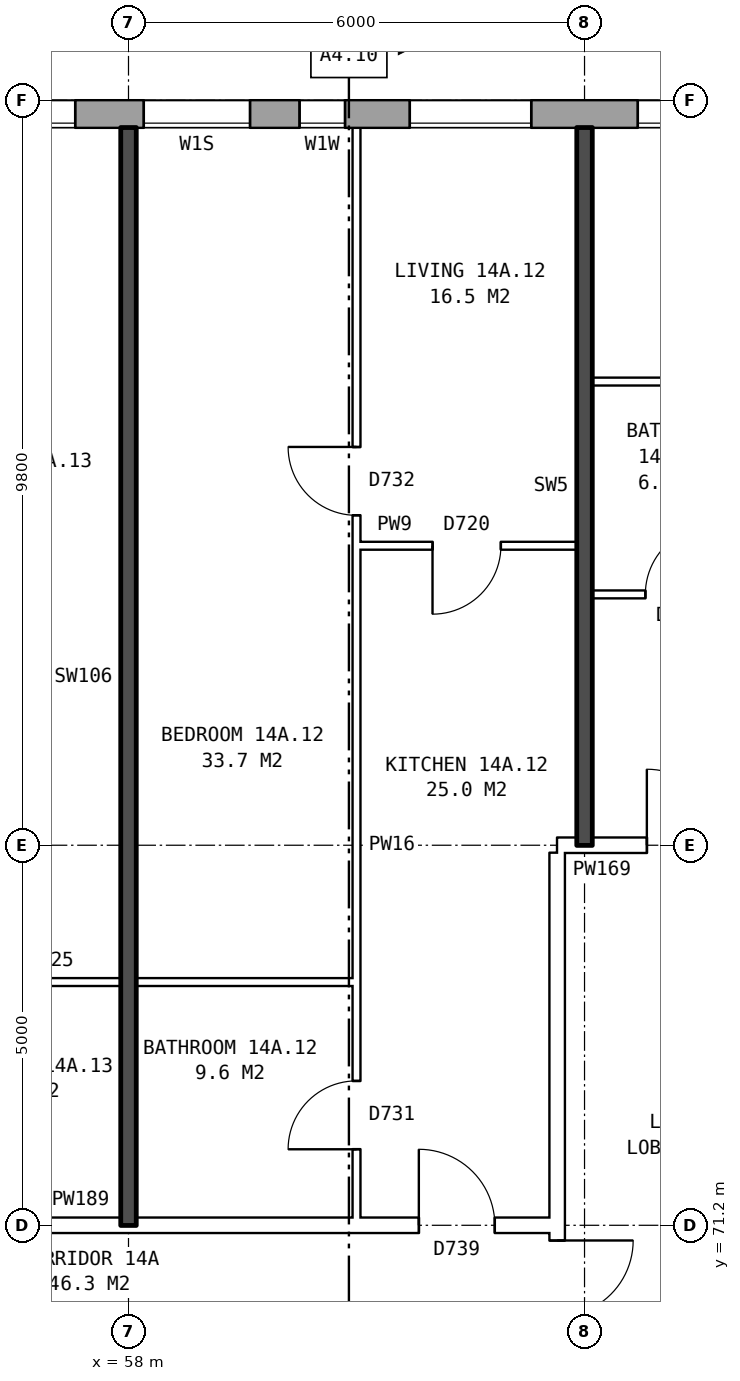
"""IFC4 building model, lengths in metres.
Left out: names, types, materials, properties, quantities, classifications, styles, units other than length and angle.
Written with IfcOpenShell. Run it as: python <this file> out.ifc"""

import sys

from ifc_helpers import new_model, si_unit, direction, frame, frame_2d, origin, place, context, subcontext, project, spatial, rectangle, extrude, element, fill, save


model = new_model("IFC4")
c1 = context("Model", 3, precision=1e-05, world=origin(), true_north=direction((0.0, 1.0)))
c2 = subcontext(c1, "Body", "Model", "MODEL_VIEW")
j1 = project(units=[si_unit("LENGTHUNIT", "METRE"), si_unit("PLANEANGLEUNIT", "RADIAN")], contexts=[c1])
p1 = place(None, origin())
s1 = spatial("IfcSite", under=j1, at=p1, CompositionType="ELEMENT")
p2 = place(p1, origin())
s2 = spatial("IfcBuilding", under=s1, at=p2, CompositionType="ELEMENT")
p3 = place(p2, frame((0.0, 0.0, 53.6)))
s3 = spatial("IfcBuildingStorey", under=s2, at=p3, CompositionType="ELEMENT", Elevation=53.6)
p4 = place(p3, frame((72.925, 85.82, 0.0), z_axis=(0.0, 0.0, 1.0), x_axis=(-1.0, 0.0, 0.0)))
e1 = element("IfcWall", 1, at=p4, inside=s3, PredefinedType="STANDARD", context=c2, shape_type="SweptSolid", body=[
    extrude(rectangle(XDim=48.351, YDim=0.36, at=frame_2d((24.175, 0.0))), origin(), (0.0, 0.0, 1.0), 2.85),
])
p5 = place(p4, frame((0.625, 0.0, 0.8)))
e2 = element("IfcOpeningElement", 2, at=p5, cuts=e1, PredefinedType="OPENING", context=c2, shape_type="SweptSolid", body=[
    extrude(rectangle(XDim=1.6, YDim=1.8, at=frame_2d((0.8, 0.9))), frame((0.0, 0.19, 0.0), z_axis=(0.0, -1.0, 0.0), x_axis=(1.0, 0.0, 0.0)), (0.0, 0.0, 1.0), 0.38),
])
p6 = place(p4, frame((3.625, 0.0, 0.8)))
e3 = element("IfcOpeningElement", 3, at=p6, cuts=e1, PredefinedType="OPENING", context=c2, shape_type="SweptSolid", body=[
    extrude(rectangle(XDim=1.6, YDim=1.8, at=frame_2d((0.8, 0.9))), frame((0.0, 0.19, 0.0), z_axis=(0.0, -1.0, 0.0), x_axis=(1.0, 0.0, 0.0)), (0.0, 0.0, 1.0), 0.38),
])
p7 = place(p4, frame((6.625, 0.0, 0.8)))
e4 = element("IfcOpeningElement", 4, at=p7, cuts=e1, PredefinedType="OPENING", context=c2, shape_type="SweptSolid", body=[
    extrude(rectangle(XDim=1.6, YDim=1.8, at=frame_2d((0.8, 0.9))), frame((0.0, 0.19, 0.0), z_axis=(0.0, -1.0, 0.0), x_axis=(1.0, 0.0, 0.0)), (0.0, 0.0, 1.0), 0.38),
])
p8 = place(p4, frame((9.625, 0.0, 0.8)))
e5 = element("IfcOpeningElement", 5, at=p8, cuts=e1, PredefinedType="OPENING", context=c2, shape_type="SweptSolid", body=[
    extrude(rectangle(XDim=1.6, YDim=1.8, at=frame_2d((0.8, 0.9))), frame((0.0, 0.19, 0.0), z_axis=(0.0, -1.0, 0.0), x_axis=(1.0, 0.0, 0.0)), (0.0, 0.0, 1.0), 0.38),
])
p9 = place(p4, frame((12.075, 0.0, 1.55)))
e6 = element("IfcOpeningElement", 6, at=p9, cuts=e1, PredefinedType="OPENING", context=c2, shape_type="SweptSolid", body=[
    extrude(rectangle(XDim=0.6, YDim=0.9, at=frame_2d((0.3, 0.45))), frame((0.0, 0.19, 0.0), z_axis=(0.0, -1.0, 0.0), x_axis=(1.0, 0.0, 0.0)), (0.0, 0.0, 1.0), 0.38),
])
p10 = place(p4, frame((15.625, 0.0, 0.8)))
e7 = element("IfcOpeningElement", 7, at=p10, cuts=e1, PredefinedType="OPENING", context=c2, shape_type="SweptSolid", body=[
    extrude(rectangle(XDim=1.6, YDim=1.8, at=frame_2d((0.8, 0.9))), frame((0.0, 0.19, 0.0), z_axis=(0.0, -1.0, 0.0), x_axis=(1.0, 0.0, 0.0)), (0.0, 0.0, 1.0), 0.38),
])
p11 = place(p4, frame((18.625, 0.0, 0.8)))
e8 = element("IfcOpeningElement", 8, at=p11, cuts=e1, PredefinedType="OPENING", context=c2, shape_type="SweptSolid", body=[
    extrude(rectangle(XDim=1.6, YDim=1.8, at=frame_2d((0.8, 0.9))), frame((0.0, 0.19, 0.0), z_axis=(0.0, -1.0, 0.0), x_axis=(1.0, 0.0, 0.0)), (0.0, 0.0, 1.0), 0.38),
])
p12 = place(p4, frame((21.625, 0.0, 0.8)))
e9 = element("IfcOpeningElement", 9, at=p12, cuts=e1, PredefinedType="OPENING", context=c2, shape_type="SweptSolid", body=[
    extrude(rectangle(XDim=1.6, YDim=1.8, at=frame_2d((0.8, 0.9))), frame((0.0, 0.19, 0.0), z_axis=(0.0, -1.0, 0.0), x_axis=(1.0, 0.0, 0.0)), (0.0, 0.0, 1.0), 0.38),
])
p13 = place(p4, frame((24.625, 0.0, 0.8)))
e10 = element("IfcOpeningElement", 10, at=p13, cuts=e1, PredefinedType="OPENING", context=c2, shape_type="SweptSolid", body=[
    extrude(rectangle(XDim=1.6, YDim=1.8, at=frame_2d((0.8, 0.9))), frame((0.0, 0.19, 0.0), z_axis=(0.0, -1.0, 0.0), x_axis=(1.0, 0.0, 0.0)), (0.0, 0.0, 1.0), 0.38),
])
p14 = place(p4, frame((27.625, 0.0, 0.8)))
e11 = element("IfcOpeningElement", 11, at=p14, cuts=e1, PredefinedType="OPENING", context=c2, shape_type="SweptSolid", body=[
    extrude(rectangle(XDim=1.6, YDim=1.8, at=frame_2d((0.8, 0.9))), frame((0.0, 0.19, 0.0), z_axis=(0.0, -1.0, 0.0), x_axis=(1.0, 0.0, 0.0)), (0.0, 0.0, 1.0), 0.38),
])
p15 = place(p4, frame((30.625, 0.0, 0.8)))
e12 = element("IfcOpeningElement", 12, at=p15, cuts=e1, PredefinedType="OPENING", context=c2, shape_type="SweptSolid", body=[
    extrude(rectangle(XDim=1.6, YDim=1.8, at=frame_2d((0.8, 0.9))), frame((0.0, 0.19, 0.0), z_axis=(0.0, -1.0, 0.0), x_axis=(1.0, 0.0, 0.0)), (0.0, 0.0, 1.0), 0.38),
])
p16 = place(p4, frame((33.125, 0.0, 0.25)))
e13 = element("IfcOpeningElement", 13, at=p16, cuts=e1, PredefinedType="OPENING", context=c2, shape_type="SweptSolid", body=[
    extrude(rectangle(XDim=0.8, YDim=1.5, at=frame_2d((0.4, 0.75))), frame((0.0, 0.19, 0.0), z_axis=(0.0, -1.0, 0.0), x_axis=(1.0, 0.0, 0.0)), (0.0, 0.0, 1.0), 0.38),
])
p17 = place(p4, frame((36.625, 0.0, 0.8)))
e14 = element("IfcOpeningElement", 14, at=p17, cuts=e1, PredefinedType="OPENING", context=c2, shape_type="SweptSolid", body=[
    extrude(rectangle(XDim=1.6, YDim=1.8, at=frame_2d((0.8, 0.9))), frame((0.0, 0.19, 0.0), z_axis=(0.0, -1.0, 0.0), x_axis=(1.0, 0.0, 0.0)), (0.0, 0.0, 1.0), 0.38),
])
p18 = place(p4, frame((39.625, 0.0, 0.8)))
e15 = element("IfcOpeningElement", 15, at=p18, cuts=e1, PredefinedType="OPENING", context=c2, shape_type="SweptSolid", body=[
    extrude(rectangle(XDim=1.6, YDim=1.8, at=frame_2d((0.8, 0.9))), frame((0.0, 0.19, 0.0), z_axis=(0.0, -1.0, 0.0), x_axis=(1.0, 0.0, 0.0)), (0.0, 0.0, 1.0), 0.38),
])
p19 = place(p4, frame((42.625, 0.0, 0.8)))
e16 = element("IfcOpeningElement", 16, at=p19, cuts=e1, PredefinedType="OPENING", context=c2, shape_type="SweptSolid", body=[
    extrude(rectangle(XDim=1.6, YDim=1.8, at=frame_2d((0.8, 0.9))), frame((0.0, 0.19, 0.0), z_axis=(0.0, -1.0, 0.0), x_axis=(1.0, 0.0, 0.0)), (0.0, 0.0, 1.0), 0.38),
])
p20 = place(p4, frame((45.625, 0.0, 0.8)))
e17 = element("IfcOpeningElement", 17, at=p20, cuts=e1, PredefinedType="OPENING", context=c2, shape_type="SweptSolid", body=[
    extrude(rectangle(XDim=1.6, YDim=1.8, at=frame_2d((0.8, 0.9))), frame((0.0, 0.19, 0.0), z_axis=(0.0, -1.0, 0.0), x_axis=(1.0, 0.0, 0.0)), (0.0, 0.0, 1.0), 0.38),
])
p21 = place(p4, frame((13.325, 0.0, 0.15)))
e18 = element("IfcOpeningElement", 18, at=p21, cuts=e1, PredefinedType="OPENING", context=c2, shape_type="SweptSolid", body=[
    extrude(rectangle(XDim=1.4, YDim=0.9, at=frame_2d((0.7, 0.45))), frame((0.0, 0.19, 0.0), z_axis=(0.0, -1.0, 0.0), x_axis=(1.0, 0.0, 0.0)), (0.0, 0.0, 1.0), 0.38),
])
p22 = place(p4, frame((34.225, 0.0, 0.25)))
e19 = element("IfcOpeningElement", 19, at=p22, cuts=e1, PredefinedType="OPENING", context=c2, shape_type="SweptSolid", body=[
    extrude(rectangle(XDim=0.6, YDim=0.9, at=frame_2d((0.3, 0.45))), frame((0.0, 0.19, 0.0), z_axis=(0.0, -1.0, 0.0), x_axis=(1.0, 0.0, 0.0)), (0.0, 0.0, 1.0), 0.38),
])
p23 = place(p3, frame((63.64, 63.9, 0.0), z_axis=(0.0, 0.0, 1.0), x_axis=(0.0, 1.0, 0.0)))
e20 = element("IfcWall", 20, at=p23, inside=s3, PredefinedType="PARTITIONING", context=c2, shape_type="SweptSolid", body=[
    extrude(rectangle(XDim=12.2, YDim=0.2, at=frame_2d((6.1, 0.0))), origin(), (0.0, 0.0, 1.0), 2.85),
])
p24 = place(p23, frame((5.1, 0.0, 0.0)))
e21 = element("IfcOpeningElement", 21, at=p24, cuts=e20, PredefinedType="OPENING", context=c2, shape_type="SweptSolid", body=[
    extrude(rectangle(XDim=2.0, YDim=2.1, at=frame_2d((1.0, 1.05))), frame((0.0, 0.11, 0.0), z_axis=(0.0, -1.0, 0.0), x_axis=(1.0, 0.0, 0.0)), (0.0, 0.0, 1.0), 0.22),
])
p25 = place(p3, frame((44.36, 71.2, 0.0), z_axis=(0.0, 0.0, 1.0), x_axis=(1.0, 0.0, 0.0)))
e22 = element("IfcWall", 22, at=p25, inside=s3, PredefinedType="PARTITIONING", context=c2, shape_type="SweptSolid", body=[
    extrude(rectangle(XDim=19.28, YDim=0.2, at=frame_2d((9.64, 0.0))), origin(), (0.0, 0.0, 1.0), 2.85),
])
p26 = place(p25, frame((17.46, 0.0, 0.0)))
e23 = element("IfcOpeningElement", 23, at=p26, cuts=e22, PredefinedType="OPENING", context=c2, shape_type="SweptSolid", body=[
    extrude(rectangle(XDim=1.0, YDim=2.1, at=frame_2d((0.5, 1.05))), frame((0.0, 0.11, 0.0), z_axis=(0.0, -1.0, 0.0), x_axis=(1.0, 0.0, 0.0)), (0.0, 0.0, 1.0), 0.22),
])
p27 = place(p25, frame((8.64, 0.0, 0.0)))
e24 = element("IfcOpeningElement", 24, at=p27, cuts=e22, PredefinedType="OPENING", context=c2, shape_type="SweptSolid", body=[
    extrude(rectangle(XDim=1.0, YDim=2.1, at=frame_2d((0.5, 1.05))), frame((0.0, 0.11, 0.0), z_axis=(0.0, -1.0, 0.0), x_axis=(1.0, 0.0, 0.0)), (0.0, 0.0, 1.0), 0.22),
])
p28 = place(p25, frame((5.64, 0.0, 0.0)))
e25 = element("IfcOpeningElement", 25, at=p28, cuts=e22, PredefinedType="OPENING", context=c2, shape_type="SweptSolid", body=[
    extrude(rectangle(XDim=1.0, YDim=2.1, at=frame_2d((0.5, 1.05))), frame((0.0, 0.11, 0.0), z_axis=(0.0, -1.0, 0.0), x_axis=(1.0, 0.0, 0.0)), (0.0, 0.0, 1.0), 0.22),
])
p29 = place(p3, frame((55.0, 74.4, 0.0), z_axis=(0.0, 0.0, 1.0), x_axis=(1.0, 0.0, 0.0)))
e26 = element("IfcWall", 26, at=p29, inside=s3, PredefinedType="PARTITIONING", context=c2, shape_type="SweptSolid", body=[
    extrude(rectangle(XDim=6.0, YDim=0.1, at=frame_2d((3.0, 0.0))), origin(), (0.0, 0.0, 1.0), 2.85),
])
p30 = place(p3, frame((63.64, 76.2, 0.0), z_axis=(0.0, 0.0, 1.0), x_axis=(1.0, 0.0, 0.0)))
e27 = element("IfcWall", 27, at=p30, inside=s3, PredefinedType="PARTITIONING", context=c2, shape_type="SweptSolid", body=[
    extrude(rectangle(XDim=3.0, YDim=0.2, at=frame_2d((1.5, 0.0))), origin(), (0.0, 0.0, 1.0), 2.85),
])
p31 = place(p30, frame((1.18, 0.0, 0.0)))
e28 = element("IfcOpeningElement", 28, at=p31, cuts=e27, PredefinedType="OPENING", context=c2, shape_type="SweptSolid", body=[
    extrude(rectangle(XDim=1.0, YDim=2.1, at=frame_2d((0.5, 1.05))), frame((0.0, 0.11, 0.0), z_axis=(0.0, -1.0, 0.0), x_axis=(1.0, 0.0, 0.0)), (0.0, 0.0, 1.0), 0.22),
])
p32 = place(p3, frame((64.1, 79.5, 0.0), z_axis=(0.0, 0.0, 1.0), x_axis=(1.0, 0.0, 0.0)))
e29 = element("IfcWall", 29, at=p32, inside=s3, PredefinedType="PARTITIONING", context=c2, shape_type="SweptSolid", body=[
    extrude(rectangle(XDim=5.8, YDim=0.1, at=frame_2d((2.9, 0.0))), origin(), (0.0, 0.0, 1.0), 2.85),
])
p33 = place(p32, frame((3.6, 0.0, 0.0)))
e30 = element("IfcOpeningElement", 30, at=p33, cuts=e29, PredefinedType="OPENING", context=c2, shape_type="SweptSolid", body=[
    extrude(rectangle(XDim=0.9, YDim=2.1, at=frame_2d((0.45, 1.05))), frame((0.0, 0.06, 0.0), z_axis=(0.0, -1.0, 0.0), x_axis=(1.0, 0.0, 0.0)), (0.0, 0.0, 1.0), 0.12),
])
p34 = place(p32, frame((0.7, 0.0, 0.0)))
e31 = element("IfcOpeningElement", 31, at=p34, cuts=e29, PredefinedType="OPENING", context=c2, shape_type="SweptSolid", body=[
    extrude(rectangle(XDim=0.9, YDim=2.1, at=frame_2d((0.45, 1.05))), frame((0.0, 0.06, 0.0), z_axis=(0.0, -1.0, 0.0), x_axis=(1.0, 0.0, 0.0)), (0.0, 0.0, 1.0), 0.12),
])
p35 = place(p3, frame((61.0, 80.14, 0.0), z_axis=(0.0, 0.0, 1.0), x_axis=(1.0, 0.0, 0.0)))
e32 = element("IfcWall", 32, at=p35, inside=s3, PredefinedType="PARTITIONING", context=c2, shape_type="SweptSolid", body=[
    extrude(rectangle(XDim=2.9, YDim=0.1, at=frame_2d((1.45, 0.0))), origin(), (0.0, 0.0, 1.0), 2.85),
])
p36 = place(p35, frame((1.0, 0.0, 0.0)))
e33 = element("IfcOpeningElement", 33, at=p36, cuts=e32, PredefinedType="OPENING", context=c2, shape_type="SweptSolid", body=[
    extrude(rectangle(XDim=0.9, YDim=2.1, at=frame_2d((0.45, 1.05))), frame((0.0, 0.06, 0.0), z_axis=(0.0, -1.0, 0.0), x_axis=(1.0, 0.0, 0.0)), (0.0, 0.0, 1.0), 0.12),
])
p37 = place(p3, frame((64.1, 82.3, 0.0), z_axis=(0.0, 0.0, 1.0), x_axis=(1.0, 0.0, 0.0)))
e34 = element("IfcWall", 34, at=p37, inside=s3, PredefinedType="PARTITIONING", context=c2, shape_type="SweptSolid", body=[
    extrude(rectangle(XDim=2.3, YDim=0.1, at=frame_2d((1.15, 0.0))), origin(), (0.0, 0.0, 1.0), 2.85),
])
p38 = place(p3, frame((58.0, 71.2, 0.0), z_axis=(0.0, 0.0, 1.0), x_axis=(0.0, 1.0, 0.0)))
e35 = element("IfcWall", 35, at=p38, inside=s3, PredefinedType="SOLIDWALL", context=c2, shape_type="SweptSolid", body=[
    extrude(rectangle(XDim=14.44, YDim=0.2, at=frame_2d((7.22, 0.0))), origin(), (0.0, 0.0, 1.0), 2.85),
])
p39 = place(p3, frame((61.0, 71.3, 0.0), z_axis=(0.0, 0.0, 1.0), x_axis=(0.0, 1.0, 0.0)))
e36 = element("IfcWall", 36, at=p39, inside=s3, PredefinedType="PARTITIONING", context=c2, shape_type="SweptSolid", body=[
    extrude(rectangle(XDim=14.34, YDim=0.1, at=frame_2d((7.17, 0.0))), origin(), (0.0, 0.0, 1.0), 2.85),
])
p40 = place(p39, frame((9.24, 0.0, 0.0)))
e37 = element("IfcOpeningElement", 37, at=p40, cuts=e36, PredefinedType="OPENING", context=c2, shape_type="SweptSolid", body=[
    extrude(rectangle(XDim=0.9, YDim=2.1, at=frame_2d((0.45, 1.05))), frame((0.0, 0.06, 0.0), z_axis=(0.0, -1.0, 0.0), x_axis=(1.0, 0.0, 0.0)), (0.0, 0.0, 1.0), 0.12),
])
p41 = place(p39, frame((0.9, 0.0, 0.0)))
e38 = element("IfcOpeningElement", 38, at=p41, cuts=e36, PredefinedType="OPENING", context=c2, shape_type="SweptSolid", body=[
    extrude(rectangle(XDim=0.9, YDim=2.1, at=frame_2d((0.45, 1.05))), frame((0.0, 0.06, 0.0), z_axis=(0.0, -1.0, 0.0), x_axis=(1.0, 0.0, 0.0)), (0.0, 0.0, 1.0), 0.12),
])
p42 = place(p3, frame((64.0, 76.2, 0.0), z_axis=(0.0, 0.0, 1.0), x_axis=(0.0, 1.0, 0.0)))
e39 = element("IfcWall", 39, at=p42, inside=s3, PredefinedType="SOLIDWALL", context=c2, shape_type="SweptSolid", body=[
    extrude(rectangle(XDim=9.44, YDim=0.2, at=frame_2d((4.72, 0.0))), origin(), (0.0, 0.0, 1.0), 2.85),
])
p43 = place(p7, origin())
e40 = element("IfcWindow", 40, at=p43, inside=s3, PartitioningType="SINGLE_PANEL", PredefinedType="WINDOW", context=c2, shape_type="SweptSolid", body=[
    extrude(rectangle(XDim=1.6, YDim=1.8, at=frame_2d((0.8, 0.9))), frame((0.0, 0.15, 0.0), z_axis=(0.0, -1.0, 0.0), x_axis=(1.0, 0.0, 0.0)), (0.0, 0.0, 1.0), 0.06),
])
fill(e4, e40)
p44 = place(p8, origin())
e41 = element("IfcWindow", 41, at=p44, inside=s3, PartitioningType="SINGLE_PANEL", PredefinedType="WINDOW", context=c2, shape_type="SweptSolid", body=[
    extrude(rectangle(XDim=1.6, YDim=1.8, at=frame_2d((0.8, 0.9))), frame((0.0, 0.15, 0.0), z_axis=(0.0, -1.0, 0.0), x_axis=(1.0, 0.0, 0.0)), (0.0, 0.0, 1.0), 0.06),
])
fill(e5, e41)
p45 = place(p9, origin())
e42 = element("IfcWindow", 42, at=p45, inside=s3, PartitioningType="SINGLE_PANEL", PredefinedType="WINDOW", context=c2, shape_type="SweptSolid", body=[
    extrude(rectangle(XDim=0.6, YDim=0.9, at=frame_2d((0.3, 0.45))), frame((0.0, 0.15, 0.0), z_axis=(0.0, -1.0, 0.0), x_axis=(1.0, 0.0, 0.0)), (0.0, 0.0, 1.0), 0.06),
])
fill(e6, e42)
p46 = place(p10, origin())
e43 = element("IfcWindow", 43, at=p46, inside=s3, PartitioningType="SINGLE_PANEL", PredefinedType="WINDOW", context=c2, shape_type="SweptSolid", body=[
    extrude(rectangle(XDim=1.6, YDim=1.8, at=frame_2d((0.8, 0.9))), frame((0.0, 0.15, 0.0), z_axis=(0.0, -1.0, 0.0), x_axis=(1.0, 0.0, 0.0)), (0.0, 0.0, 1.0), 0.06),
])
fill(e7, e43)
p47 = place(p24, frame((2.0, 0.0, 0.0), z_axis=(0.0, 0.0, 1.0), x_axis=(-1.0, 0.0, 0.0)))
e44 = element("IfcDoor", 44, at=p47, inside=s3, OperationType="DOUBLE_DOOR_SINGLE_SWING", PredefinedType="DOOR", context=c2, shape_type="SweptSolid", body=[
    extrude(rectangle(XDim=2.0, YDim=2.1, at=frame_2d((1.0, 1.05))), frame((0.0, 0.025, 0.0), z_axis=(0.0, -1.0, 0.0), x_axis=(1.0, 0.0, 0.0)), (0.0, 0.0, 1.0), 0.05),
])
fill(e21, e44)
p48 = place(p31, origin())
e45 = element("IfcDoor", 45, at=p48, inside=s3, OperationType="SINGLE_SWING_LEFT", PredefinedType="DOOR", context=c2, shape_type="SweptSolid", body=[
    extrude(rectangle(XDim=1.0, YDim=2.1, at=frame_2d((0.5, 1.05))), frame((0.0, 0.025, 0.0), z_axis=(0.0, -1.0, 0.0), x_axis=(1.0, 0.0, 0.0)), (0.0, 0.0, 1.0), 0.05),
])
fill(e28, e45)
p49 = place(p34, origin())
e46 = element("IfcDoor", 46, at=p49, inside=s3, OperationType="SINGLE_SWING_RIGHT", PredefinedType="DOOR", context=c2, shape_type="SweptSolid", body=[
    extrude(rectangle(XDim=0.9, YDim=2.1, at=frame_2d((0.45, 1.05))), frame((0.0, 0.025, 0.0), z_axis=(0.0, -1.0, 0.0), x_axis=(1.0, 0.0, 0.0)), (0.0, 0.0, 1.0), 0.05),
])
fill(e31, e46)
p50 = place(p40, origin())
e47 = element("IfcDoor", 47, at=p50, inside=s3, OperationType="SINGLE_SWING_RIGHT", PredefinedType="DOOR", context=c2, shape_type="SweptSolid", body=[
    extrude(rectangle(XDim=0.9, YDim=2.1, at=frame_2d((0.45, 1.05))), frame((0.0, 0.025, 0.0), z_axis=(0.0, -1.0, 0.0), x_axis=(1.0, 0.0, 0.0)), (0.0, 0.0, 1.0), 0.05),
])
fill(e37, e47)
p51 = place(p26, origin())
e48 = element("IfcDoor", 48, at=p51, inside=s3, OperationType="SINGLE_SWING_LEFT", PredefinedType="DOOR", context=c2, shape_type="SweptSolid", body=[
    extrude(rectangle(XDim=1.0, YDim=2.1, at=frame_2d((0.5, 1.05))), frame((0.0, 0.025, 0.0), z_axis=(0.0, -1.0, 0.0), x_axis=(1.0, 0.0, 0.0)), (0.0, 0.0, 1.0), 0.05),
])
fill(e23, e48)
p52 = place(p36, frame((0.9, 0.0, 0.0), z_axis=(0.0, 0.0, 1.0), x_axis=(-1.0, 0.0, 0.0)))
e49 = element("IfcDoor", 49, at=p52, inside=s3, OperationType="SINGLE_SWING_RIGHT", PredefinedType="DOOR", context=c2, shape_type="SweptSolid", body=[
    extrude(rectangle(XDim=0.9, YDim=2.1, at=frame_2d((0.45, 1.05))), frame((0.0, 0.025, 0.0), z_axis=(0.0, -1.0, 0.0), x_axis=(1.0, 0.0, 0.0)), (0.0, 0.0, 1.0), 0.05),
])
fill(e33, e49)
p53 = place(p41, origin())
e50 = element("IfcDoor", 50, at=p53, inside=s3, OperationType="SINGLE_SWING_LEFT", PredefinedType="DOOR", context=c2, shape_type="SweptSolid", body=[
    extrude(rectangle(XDim=0.9, YDim=2.1, at=frame_2d((0.45, 1.05))), frame((0.0, 0.025, 0.0), z_axis=(0.0, -1.0, 0.0), x_axis=(1.0, 0.0, 0.0)), (0.0, 0.0, 1.0), 0.05),
])
fill(e38, e50)
p54 = place(p21, origin())
e51 = element("IfcWindow", 51, at=p54, inside=s3, PartitioningType="SINGLE_PANEL", PredefinedType="WINDOW", context=c2, shape_type="SweptSolid", body=[
    extrude(rectangle(XDim=1.4, YDim=0.9, at=frame_2d((0.7, 0.45))), frame((0.0, 0.15, 0.0), z_axis=(0.0, -1.0, 0.0), x_axis=(1.0, 0.0, 0.0)), (0.0, 0.0, 1.0), 0.06),
])
fill(e18, e51)
save(model, sys.argv[1])
